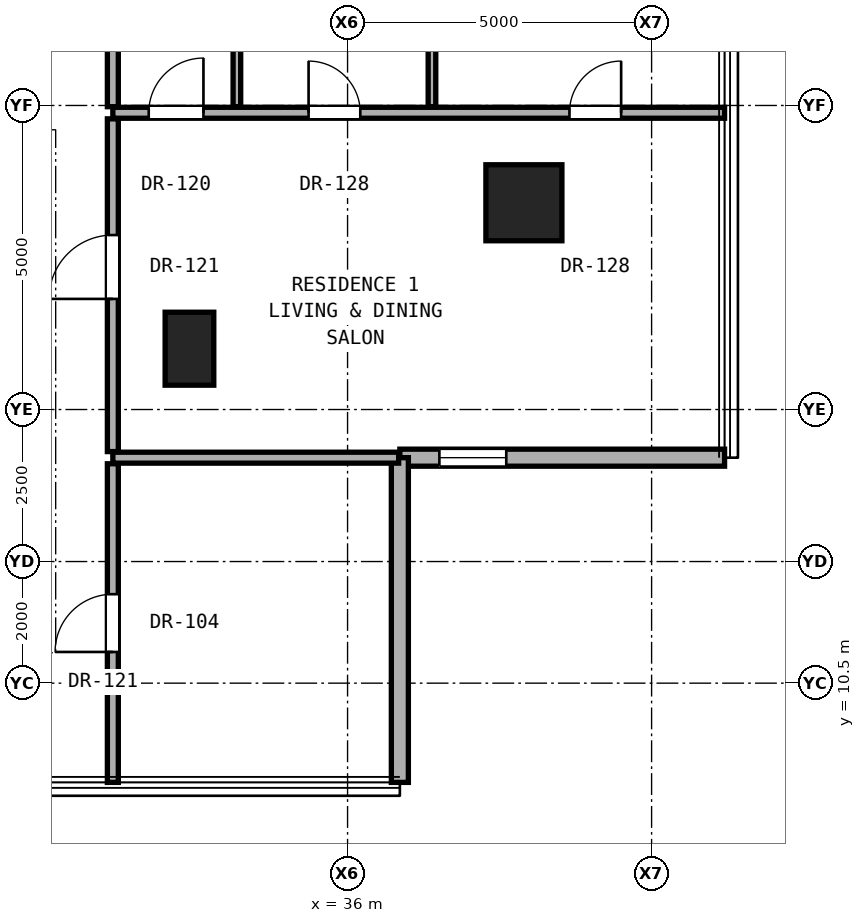
"""IFC4 building model, lengths in metres.
Left out: names, types, materials, properties, quantities, classifications, styles, units other than length and angle.
Written with IfcOpenShell. Run it as: python <this file> out.ifc"""

import sys

from ifc_helpers import new_model, si_unit, direction, frame, frame_2d, origin, origin_2d, place, context, subcontext, project, spatial, rectangle, hollow_rectangle, extrude, element, fill, save


model = new_model("IFC4")
c1 = context("Model", 3, precision=1e-05, world=origin(), true_north=direction((0.0, 1.0)))
c2 = subcontext(c1, "Body", "Model", "MODEL_VIEW")
j1 = project(units=[si_unit("LENGTHUNIT", "METRE"), si_unit("PLANEANGLEUNIT", "RADIAN")], contexts=[c1])
p1 = place(None, origin())
s1 = spatial("IfcSite", under=j1, at=p1, CompositionType="ELEMENT")
p2 = place(p1, origin())
s2 = spatial("IfcBuilding", under=s1, at=p2, CompositionType="ELEMENT")
p3 = place(p2, frame((0.0, 0.0, 65.3)))
s3 = spatial("IfcBuildingStorey", under=s2, at=p3, CompositionType="ELEMENT", Elevation=65.3)
p4 = place(p3, frame((38.9, 18.4, 0.0), z_axis=(0.0, 0.0, 1.0), x_axis=(1.0, 0.0, 0.0)))
e1 = element("IfcColumn", 1, at=p4, inside=s3, PredefinedType="COLUMN", context=c2, shape_type="SweptSolid", body=[
    extrude(hollow_rectangle(XDim=1.25, YDim=1.25, WallThickness=0.07, at=origin_2d()), origin(), (0.0, 0.0, 1.0), 3.3),
])
p5 = place(p3, frame((33.4, 16.0, 0.0), z_axis=(0.0, 0.0, 1.0), x_axis=(1.0, 0.0, 0.0)))
e2 = element("IfcColumn", 2, at=p5, inside=s3, PredefinedType="PILASTER", context=c2, shape_type="SweptSolid", body=[
    extrude(rectangle(XDim=0.8, YDim=1.2, at=origin_2d()), origin(), (0.0, 0.0, 1.0), 3.3),
])
p6 = place(p3, frame((36.86, 14.208, 0.0), z_axis=(0.0, 0.0, 1.0), x_axis=(1.0, 0.0, 0.0)))
e3 = element("IfcWall", 3, at=p6, inside=s3, PredefinedType="SOLIDWALL", context=c2, shape_type="SweptSolid", body=[
    extrude(rectangle(XDim=5.34, YDim=0.28, at=frame_2d((2.67, 0.0))), origin(), (0.0, 0.0, 1.0), 3.04),
])
p7 = place(p6, frame((0.65, 0.0, 0.85)))
e4 = element("IfcOpeningElement", 4, at=p7, cuts=e3, PredefinedType="OPENING", context=c2, shape_type="SweptSolid", body=[
    extrude(rectangle(XDim=1.1, YDim=2.0, at=frame_2d((0.55, 1.0))), frame((0.0, 0.15, 0.0), z_axis=(0.0, -1.0, 0.0), x_axis=(1.0, 0.0, 0.0)), (0.0, 0.0, 1.0), 0.3),
])
p8 = place(p3, frame((36.86, 8.868, 0.0), z_axis=(0.0, 0.0, 1.0), x_axis=(0.0, 1.0, 0.0)))
e5 = element("IfcWall", 5, at=p8, inside=s3, PredefinedType="SOLIDWALL", context=c2, shape_type="SweptSolid", body=[
    extrude(rectangle(XDim=5.34, YDim=0.28, at=frame_2d((2.67, 0.0))), origin(), (0.0, 0.0, 1.0), 3.04),
])
p9 = place(p3, frame((32.14, 14.208, 0.0), z_axis=(0.0, 0.0, 1.0), x_axis=(1.0, 0.0, 0.0)))
e6 = element("IfcWall", 6, at=p9, inside=s3, PredefinedType="PARTITIONING", context=c2, shape_type="SweptSolid", body=[
    extrude(rectangle(XDim=4.7, YDim=0.18, at=frame_2d((2.35, 0.0))), origin(), (0.0, 0.0, 1.0), 3.06),
])
p10 = place(p3, frame((32.14, 19.88, 0.0), z_axis=(0.0, 0.0, 1.0), x_axis=(1.0, 0.0, 0.0)))
e7 = element("IfcWall", 7, at=p10, inside=s3, PredefinedType="PARTITIONING", context=c2, shape_type="SweptSolid", body=[
    extrude(rectangle(XDim=10.06, YDim=0.18, at=frame_2d((5.03, 0.0))), origin(), (0.0, 0.0, 1.0), 2.125),
])
p11 = place(p10, frame((7.509, 0.0, 0.0)))
e8 = element("IfcOpeningElement", 8, at=p11, cuts=e7, PredefinedType="OPENING", context=c2, shape_type="SweptSolid", body=[
    extrude(rectangle(XDim=0.85, YDim=2.01, at=frame_2d((0.425, 1.005))), frame((0.0, 0.1, 0.0), z_axis=(0.0, -1.0, 0.0), x_axis=(1.0, 0.0, 0.0)), (0.0, 0.0, 1.0), 0.2),
])
p12 = place(p10, frame((3.219, 0.0, 0.0)))
e9 = element("IfcOpeningElement", 9, at=p12, cuts=e7, PredefinedType="OPENING", context=c2, shape_type="SweptSolid", body=[
    extrude(rectangle(XDim=0.85, YDim=2.01, at=frame_2d((0.425, 1.005))), frame((0.0, 0.1, 0.0), z_axis=(0.0, -1.0, 0.0), x_axis=(1.0, 0.0, 0.0)), (0.0, 0.0, 1.0), 0.2),
])
p13 = place(p10, frame((0.59, 0.0, 0.0)))
e10 = element("IfcOpeningElement", 10, at=p13, cuts=e7, PredefinedType="OPENING", context=c2, shape_type="SweptSolid", body=[
    extrude(rectangle(XDim=0.9, YDim=2.1, at=frame_2d((0.45, 1.05))), frame((0.0, 0.1, 0.0), z_axis=(0.0, -1.0, 0.0), x_axis=(1.0, 0.0, 0.0)), (0.0, 0.0, 1.0), 0.2),
])
p14 = place(p3, frame((32.14, 8.868, 0.0), z_axis=(0.0, 0.0, 1.0), x_axis=(0.0, 1.0, 0.0)))
e11 = element("IfcWall", 11, at=p14, inside=s3, PredefinedType="PARTITIONING", context=c2, shape_type="SweptSolid", body=[
    extrude(rectangle(XDim=5.24, YDim=0.18, at=frame_2d((2.62, 0.0))), origin(), (0.0, 0.0, 1.0), 3.06),
])
p15 = place(p14, frame((2.145, 0.0, 0.0)))
e12 = element("IfcOpeningElement", 12, at=p15, cuts=e11, PredefinedType="OPENING", context=c2, shape_type="SweptSolid", body=[
    extrude(rectangle(XDim=0.95, YDim=2.15, at=frame_2d((0.475, 1.075))), frame((0.0, 0.1, 0.0), z_axis=(0.0, -1.0, 0.0), x_axis=(1.0, 0.0, 0.0)), (0.0, 0.0, 1.0), 0.2),
])
p16 = place(p3, frame((32.14, 14.308, 0.0), z_axis=(0.0, 0.0, 1.0), x_axis=(0.0, 1.0, 0.0)))
e13 = element("IfcWall", 13, at=p16, inside=s3, PredefinedType="PARTITIONING", context=c2, shape_type="SweptSolid", body=[
    extrude(rectangle(XDim=5.472, YDim=0.18, at=frame_2d((2.736, 0.0))), origin(), (0.0, 0.0, 1.0), 2.436),
])
p17 = place(p16, frame((2.511, 0.0, 0.0)))
e14 = element("IfcOpeningElement", 14, at=p17, cuts=e13, PredefinedType="OPENING", context=c2, shape_type="SweptSolid", body=[
    extrude(rectangle(XDim=1.05, YDim=2.2, at=frame_2d((0.525, 1.1))), frame((0.0, 0.1, 0.0), z_axis=(0.0, -1.0, 0.0), x_axis=(1.0, 0.0, 0.0)), (0.0, 0.0, 1.0), 0.2),
])
p18 = place(p3, frame((32.14, 19.98, 0.0), z_axis=(0.0, 0.0, 1.0), x_axis=(0.0, 1.0, 0.0)))
e15 = element("IfcWall", 15, at=p18, inside=s3, PredefinedType="PARTITIONING", context=c2, shape_type="SweptSolid", body=[
    extrude(rectangle(XDim=2.52, YDim=0.18, at=frame_2d((1.26, 0.0))), origin(), (0.0, 0.0, 1.0), 3.06),
])
for number, where, z_axis, x_axis in (
    (16, (34.18, 19.98, 0.0), (0.0, 0.0, 1.0), (0.0, 1.0, 0.0)),
    (17, (37.388, 19.98, 0.0), (0.0, 0.0, 1.0), (0.0, 1.0, 0.0)),
):
    element("IfcWall", number, at=place(p3, frame(where, z_axis=z_axis, x_axis=x_axis)), inside=s3, PredefinedType="PARTITIONING", context=c2, shape_type="SweptSolid", body=[
        extrude(rectangle(XDim=2.52, YDim=0.125, at=frame_2d((1.26, 0.0))), origin(), (0.0, 0.0, 1.0), 3.06),
    ])
p19 = place(p7, origin())
e18 = element("IfcWindow", 18, at=p19, inside=s3, PartitioningType="SINGLE_PANEL", PredefinedType="WINDOW", context=c2, shape_type="SweptSolid", body=[
    extrude(rectangle(XDim=1.1, YDim=2.0, at=frame_2d((0.55, 1.0))), frame((0.0, 0.03, 0.0), z_axis=(0.0, -1.0, 0.0), x_axis=(1.0, 0.0, 0.0)), (0.0, 0.0, 1.0), 0.06),
])
fill(e4, e18)
p20 = place(p17, origin())
e19 = element("IfcDoor", 19, at=p20, inside=s3, OperationType="SINGLE_SWING_LEFT", PredefinedType="DOOR", context=c2, shape_type="SweptSolid", body=[
    extrude(rectangle(XDim=1.05, YDim=2.2, at=frame_2d((0.525, 1.1))), frame((0.0, 0.025, 0.0), z_axis=(0.0, -1.0, 0.0), x_axis=(1.0, 0.0, 0.0)), (0.0, 0.0, 1.0), 0.05),
])
fill(e14, e19)
p21 = place(p11, origin())
e20 = element("IfcDoor", 20, at=p21, inside=s3, OperationType="SINGLE_SWING_RIGHT", PredefinedType="DOOR", context=c2, shape_type="SweptSolid", body=[
    extrude(rectangle(XDim=0.85, YDim=2.01, at=frame_2d((0.425, 1.005))), frame((0.0, 0.025, 0.0), z_axis=(0.0, -1.0, 0.0), x_axis=(1.0, 0.0, 0.0)), (0.0, 0.0, 1.0), 0.05),
])
fill(e8, e20)
p22 = place(p12, origin())
e21 = element("IfcDoor", 21, at=p22, inside=s3, OperationType="SINGLE_SWING_LEFT", PredefinedType="DOOR", context=c2, shape_type="SweptSolid", body=[
    extrude(rectangle(XDim=0.85, YDim=2.01, at=frame_2d((0.425, 1.005))), frame((0.0, 0.025, 0.0), z_axis=(0.0, -1.0, 0.0), x_axis=(1.0, 0.0, 0.0)), (0.0, 0.0, 1.0), 0.05),
])
fill(e9, e21)
p23 = place(p13, origin())
e22 = element("IfcDoor", 22, at=p23, inside=s3, OperationType="SINGLE_SWING_RIGHT", PredefinedType="DOOR", context=c2, shape_type="SweptSolid", body=[
    extrude(rectangle(XDim=0.9, YDim=2.1, at=frame_2d((0.45, 1.05))), frame((0.0, 0.025, 0.0), z_axis=(0.0, -1.0, 0.0), x_axis=(1.0, 0.0, 0.0)), (0.0, 0.0, 1.0), 0.05),
])
fill(e10, e22)
p24 = place(p15, origin())
e23 = element("IfcDoor", 23, at=p24, inside=s3, OperationType="SINGLE_SWING_LEFT", PredefinedType="DOOR", context=c2, shape_type="SweptSolid", body=[
    extrude(rectangle(XDim=0.95, YDim=2.15, at=frame_2d((0.475, 1.075))), frame((0.0, 0.025, 0.0), z_axis=(0.0, -1.0, 0.0), x_axis=(1.0, 0.0, 0.0)), (0.0, 0.0, 1.0), 0.05),
])
fill(e12, e23)
save(model, sys.argv[1])
